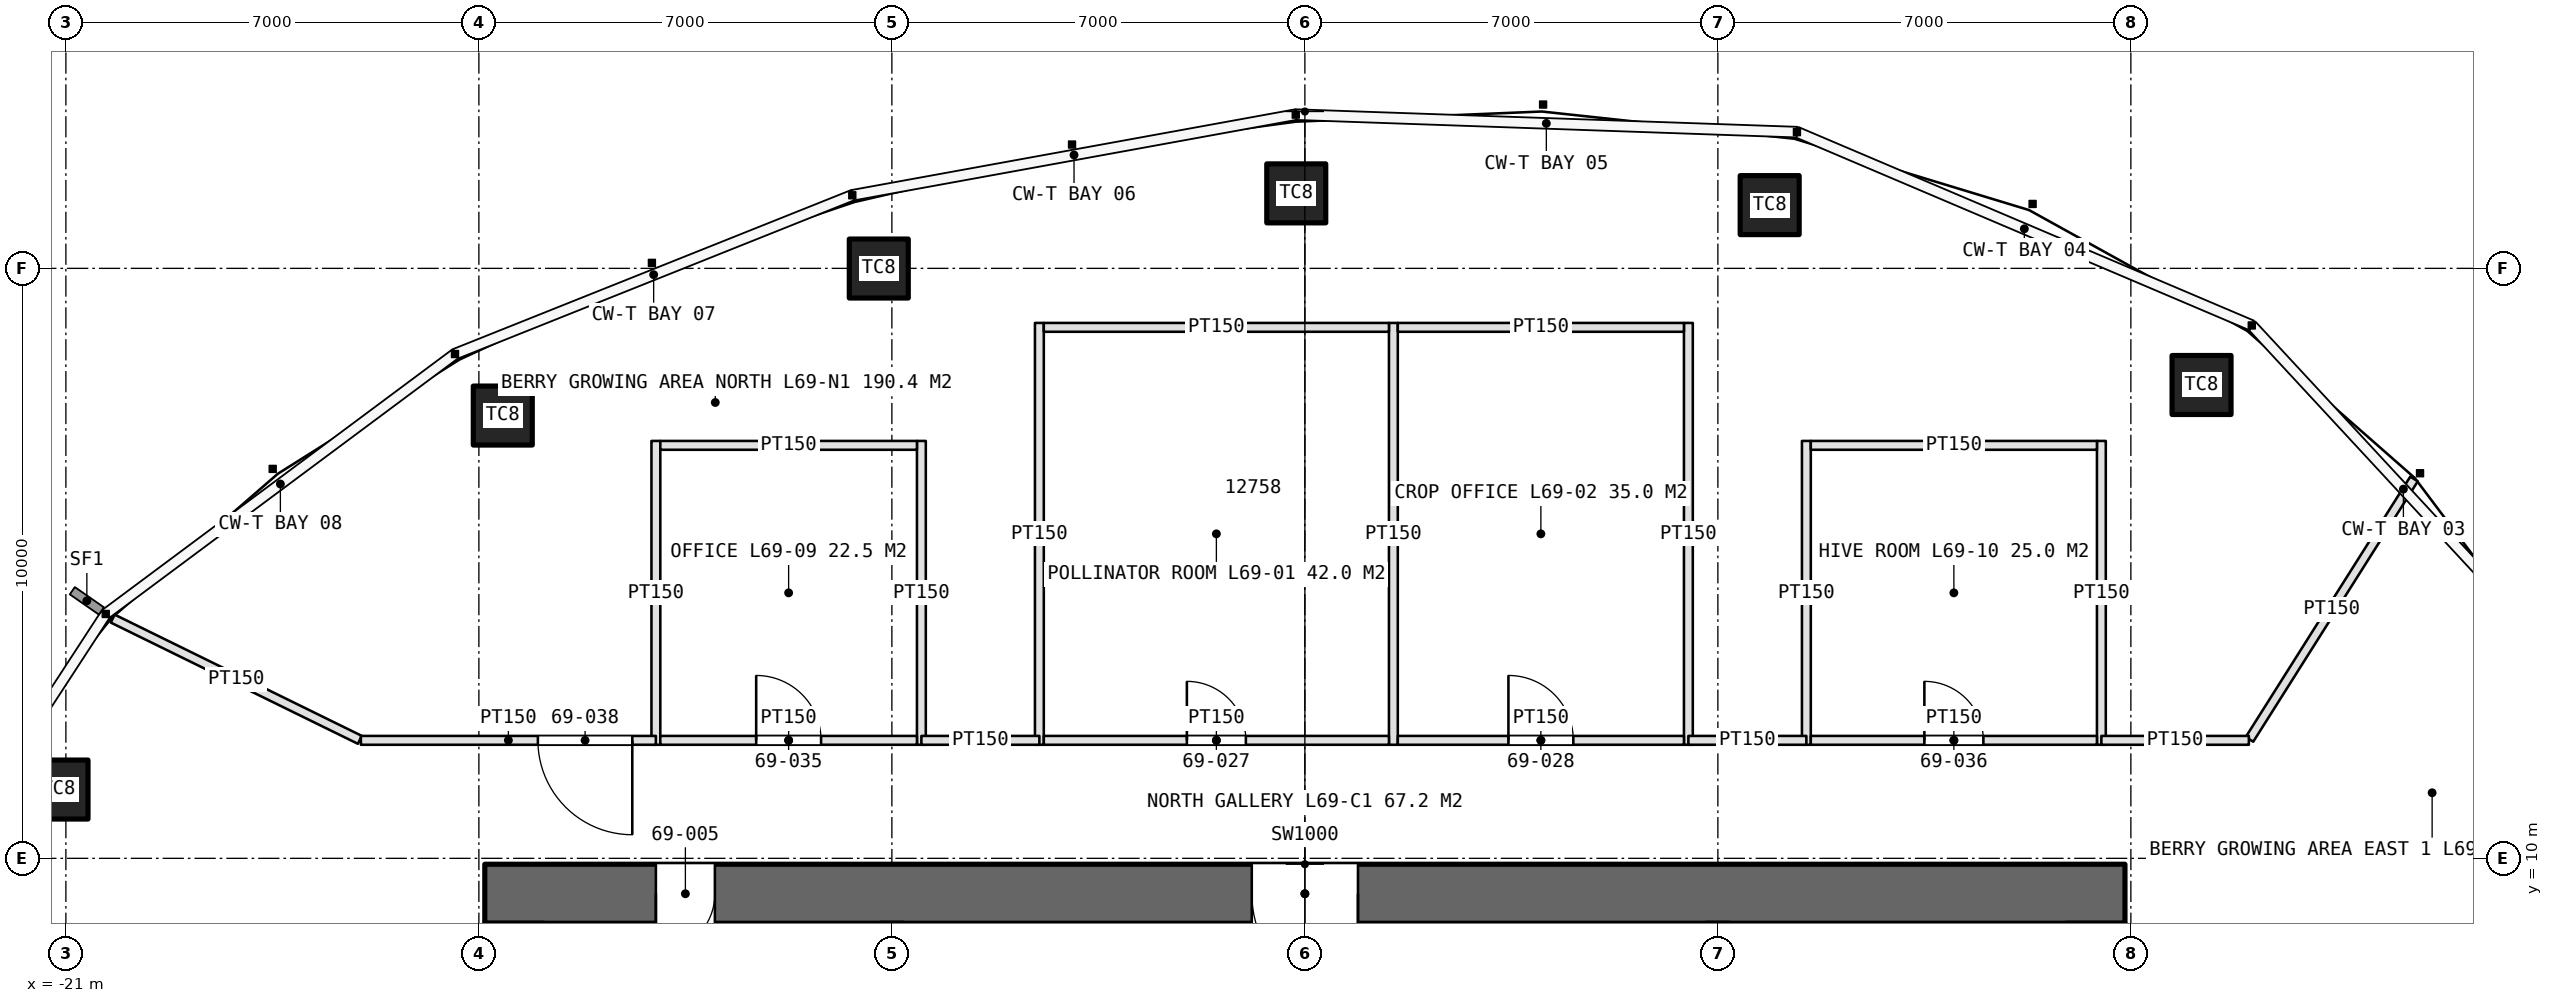
"""IFC4 building model, lengths in metres.
Left out: names, types, materials, properties, quantities, classifications, styles, units other than length and angle.
Written with IfcOpenShell. Run it as: python <this file> out.ifc"""

import sys

from ifc_helpers import new_model, si_unit, direction, frame, frame_2d, origin, origin_2d, place, context, subcontext, project, spatial, rectangle, extrude, element, fill, save


model = new_model("IFC4")
c1 = context("Model", 3, precision=1e-05, world=origin(), true_north=direction((0.0, 1.0)))
c2 = subcontext(c1, "Body", "Model", "MODEL_VIEW")
j1 = project(units=[si_unit("LENGTHUNIT", "METRE"), si_unit("PLANEANGLEUNIT", "RADIAN")], contexts=[c1])
p1 = place(None, origin())
s1 = spatial("IfcSite", under=j1, at=p1, CompositionType="ELEMENT")
p2 = place(p1, origin())
s2 = spatial("IfcBuilding", under=s1, at=p2, CompositionType="ELEMENT")
p3 = place(p2, frame((0.0, 0.0, 309.0)))
s3 = spatial("IfcBuildingStorey", under=s2, at=p3, CompositionType="ELEMENT", Elevation=309.0)
p4 = place(p3, frame((13.9, 9.4, 0.0), z_axis=(0.0, 0.0, 1.0), x_axis=(-1.0, 0.0, 0.0)))
e1 = element("IfcWall", 1, at=p4, inside=s3, PredefinedType="SHEAR", context=c2, shape_type="SweptSolid", body=[
    extrude(rectangle(XDim=27.8, YDim=1.0, at=frame_2d((13.9, 0.0))), origin(), (0.0, 0.0, 1.0), 4.2),
])
p5 = place(p4, frame((23.9, 0.0, 0.0)))
e2 = element("IfcOpeningElement", 2, at=p5, cuts=e1, PredefinedType="OPENING", context=c2, shape_type="SweptSolid", body=[
    extrude(rectangle(XDim=1.0, YDim=2.4, at=frame_2d((0.5, 1.2))), frame((0.0, 0.51, 0.0), z_axis=(0.0, -1.0, 0.0), x_axis=(1.0, 0.0, 0.0)), (0.0, 0.0, 1.0), 1.02),
])
p6 = place(p4, frame((13.0, 0.0, 0.0)))
e3 = element("IfcOpeningElement", 3, at=p6, cuts=e1, PredefinedType="OPENING", context=c2, shape_type="SweptSolid", body=[
    extrude(rectangle(XDim=1.8, YDim=2.4, at=frame_2d((0.9, 1.2))), frame((0.0, 0.51, 0.0), z_axis=(0.0, -1.0, 0.0), x_axis=(1.0, 0.0, 0.0)), (0.0, 0.0, 1.0), 1.02),
])
for number, where, z_axis, x_axis in (
    (4, (15.198, 18.023, 0.0), (0.0, 0.0, 1.0), (1.0, 0.0, 0.0)),
    (5, (7.878, 21.072, 0.0), (0.0, 0.0, 1.0), (1.0, 0.0, 0.0)),
    (6, (-0.146, 21.271, 0.0), (0.0, 0.0, 1.0), (1.0, 0.0, 0.0)),
    (7, (-7.222, 19.997, 0.0), (0.0, 0.0, 1.0), (1.0, 0.0, 0.0)),
    (8, (-13.595, 17.505, 0.0), (0.0, 0.0, 1.0), (1.0, 0.0, 0.0)),
    (9, (-21.125, 11.166, 0.0), (0.0, 0.0, 1.0), (1.0, 0.0, 0.0)),
):
    element("IfcColumn", number, at=place(p3, frame(where, z_axis=z_axis, x_axis=x_axis)), inside=s3, PredefinedType="COLUMN", context=c2, shape_type="SweptSolid", body=[
        extrude(rectangle(XDim=1.0, YDim=1.0, at=origin_2d()), origin(), (0.0, 0.0, 1.0), 4.2),
    ])
for number, where, z_axis, x_axis in (
    (10, (-4.5, 11.925, 0.0), (0.0, 0.0, 1.0), (0.0, 1.0, 0.0)),
    (11, (1.5, 11.925, 0.0), (0.0, 0.0, 1.0), (0.0, 1.0, 0.0)),
    (12, (6.5, 11.925, 0.0), (0.0, 0.0, 1.0), (0.0, 1.0, 0.0)),
):
    element("IfcWall", number, at=place(p3, frame(where, z_axis=z_axis, x_axis=x_axis)), inside=s3, PredefinedType="PARTITIONING", context=c2, shape_type="SweptSolid", body=[
        extrude(rectangle(XDim=7.15, YDim=0.15, at=frame_2d((3.575, 0.0))), origin(), (0.0, 0.0, 1.0), 3.0),
    ])
p7 = place(p3, frame((-4.425, 12.0, 0.0), z_axis=(0.0, 0.0, 1.0), x_axis=(1.0, 0.0, 0.0)))
e13 = element("IfcWall", 13, at=p7, inside=s3, PredefinedType="PARTITIONING", context=c2, shape_type="SweptSolid", body=[
    extrude(rectangle(XDim=5.85, YDim=0.15, at=frame_2d((2.925, 0.0))), origin(), (0.0, 0.0, 1.0), 3.0),
])
p8 = place(p7, frame((2.425, 0.0, 0.0)))
e14 = element("IfcOpeningElement", 14, at=p8, cuts=e13, PredefinedType="OPENING", context=c2, shape_type="SweptSolid", body=[
    extrude(rectangle(XDim=1.0, YDim=2.2, at=frame_2d((0.5, 1.1))), frame((0.0, 0.085, 0.0), z_axis=(0.0, -1.0, 0.0), x_axis=(1.0, 0.0, 0.0)), (0.0, 0.0, 1.0), 0.17),
])
p9 = place(p3, frame((-4.425, 19.0, 0.0), z_axis=(0.0, 0.0, 1.0), x_axis=(1.0, 0.0, 0.0)))
e15 = element("IfcWall", 15, at=p9, inside=s3, PredefinedType="PARTITIONING", context=c2, shape_type="SweptSolid", body=[
    extrude(rectangle(XDim=5.85, YDim=0.15, at=frame_2d((2.925, 0.0))), origin(), (0.0, 0.0, 1.0), 3.0),
])
p10 = place(p3, frame((1.575, 12.0, 0.0), z_axis=(0.0, 0.0, 1.0), x_axis=(1.0, 0.0, 0.0)))
e16 = element("IfcWall", 16, at=p10, inside=s3, PredefinedType="PARTITIONING", context=c2, shape_type="SweptSolid", body=[
    extrude(rectangle(XDim=4.85, YDim=0.15, at=frame_2d((2.425, 0.0))), origin(), (0.0, 0.0, 1.0), 3.0),
])
p11 = place(p10, frame((1.875, 0.0, 0.0)))
e17 = element("IfcOpeningElement", 17, at=p11, cuts=e16, PredefinedType="OPENING", context=c2, shape_type="SweptSolid", body=[
    extrude(rectangle(XDim=1.1, YDim=2.3, at=frame_2d((0.55, 1.15))), frame((0.0, 0.085, 0.0), z_axis=(0.0, -1.0, 0.0), x_axis=(1.0, 0.0, 0.0)), (0.0, 0.0, 1.0), 0.17),
])
p12 = place(p3, frame((1.575, 19.0, 0.0), z_axis=(0.0, 0.0, 1.0), x_axis=(1.0, 0.0, 0.0)))
e18 = element("IfcWall", 18, at=p12, inside=s3, PredefinedType="PARTITIONING", context=c2, shape_type="SweptSolid", body=[
    extrude(rectangle(XDim=4.85, YDim=0.15, at=frame_2d((2.425, 0.0))), origin(), (0.0, 0.0, 1.0), 3.0),
])
for number, where, z_axis, x_axis in (
    (19, (-11.0, 11.925, 0.0), (0.0, 0.0, 1.0), (0.0, 1.0, 0.0)),
    (20, (-6.5, 11.925, 0.0), (0.0, 0.0, 1.0), (0.0, 1.0, 0.0)),
):
    element("IfcWall", number, at=place(p3, frame(where, z_axis=z_axis, x_axis=x_axis)), inside=s3, PredefinedType="PARTITIONING", context=c2, shape_type="SweptSolid", body=[
        extrude(rectangle(XDim=5.15, YDim=0.15, at=frame_2d((2.575, 0.0))), origin(), (0.0, 0.0, 1.0), 3.0),
    ])
p13 = place(p3, frame((-10.925, 12.0, 0.0), z_axis=(0.0, 0.0, 1.0), x_axis=(1.0, 0.0, 0.0)))
e21 = element("IfcWall", 21, at=p13, inside=s3, PredefinedType="PARTITIONING", context=c2, shape_type="SweptSolid", body=[
    extrude(rectangle(XDim=4.35, YDim=0.15, at=frame_2d((2.175, 0.0))), origin(), (0.0, 0.0, 1.0), 3.0),
])
p14 = place(p13, frame((1.625, 0.0, 0.0)))
e22 = element("IfcOpeningElement", 22, at=p14, cuts=e21, PredefinedType="OPENING", context=c2, shape_type="SweptSolid", body=[
    extrude(rectangle(XDim=1.1, YDim=2.3, at=frame_2d((0.55, 1.15))), frame((0.0, 0.085, 0.0), z_axis=(0.0, -1.0, 0.0), x_axis=(1.0, 0.0, 0.0)), (0.0, 0.0, 1.0), 0.17),
])
p15 = place(p3, frame((-10.925, 17.0, 0.0), z_axis=(0.0, 0.0, 1.0), x_axis=(1.0, 0.0, 0.0)))
e23 = element("IfcWall", 23, at=p15, inside=s3, PredefinedType="PARTITIONING", context=c2, shape_type="SweptSolid", body=[
    extrude(rectangle(XDim=4.35, YDim=0.15, at=frame_2d((2.175, 0.0))), origin(), (0.0, 0.0, 1.0), 3.0),
])
for number, where, z_axis, x_axis in (
    (24, (8.5, 11.925, 0.0), (0.0, 0.0, 1.0), (0.0, 1.0, 0.0)),
    (25, (13.5, 11.925, 0.0), (0.0, 0.0, 1.0), (0.0, 1.0, 0.0)),
):
    element("IfcWall", number, at=place(p3, frame(where, z_axis=z_axis, x_axis=x_axis)), inside=s3, PredefinedType="PARTITIONING", context=c2, shape_type="SweptSolid", body=[
        extrude(rectangle(XDim=5.15, YDim=0.15, at=frame_2d((2.575, 0.0))), origin(), (0.0, 0.0, 1.0), 3.0),
    ])
p16 = place(p3, frame((8.575, 12.0, 0.0), z_axis=(0.0, 0.0, 1.0), x_axis=(1.0, 0.0, 0.0)))
e26 = element("IfcWall", 26, at=p16, inside=s3, PredefinedType="PARTITIONING", context=c2, shape_type="SweptSolid", body=[
    extrude(rectangle(XDim=4.85, YDim=0.15, at=frame_2d((2.425, 0.0))), origin(), (0.0, 0.0, 1.0), 3.0),
])
p17 = place(p16, frame((1.925, 0.0, 0.0)))
e27 = element("IfcOpeningElement", 27, at=p17, cuts=e26, PredefinedType="OPENING", context=c2, shape_type="SweptSolid", body=[
    extrude(rectangle(XDim=1.0, YDim=2.2, at=frame_2d((0.5, 1.1))), frame((0.0, 0.085, 0.0), z_axis=(0.0, -1.0, 0.0), x_axis=(1.0, 0.0, 0.0)), (0.0, 0.0, 1.0), 0.17),
])
p18 = place(p3, frame((8.575, 17.0, 0.0), z_axis=(0.0, 0.0, 1.0), x_axis=(1.0, 0.0, 0.0)))
e28 = element("IfcWall", 28, at=p18, inside=s3, PredefinedType="PARTITIONING", context=c2, shape_type="SweptSolid", body=[
    extrude(rectangle(XDim=4.85, YDim=0.15, at=frame_2d((2.425, 0.0))), origin(), (0.0, 0.0, 1.0), 3.0),
])
p19 = place(p3, frame((-16.018, 12.009, 0.0), z_axis=(0.0, 0.0, 1.0), x_axis=(-0.897771840996, 0.440460805879, 0.0)))
e29 = element("IfcWall", 29, at=p19, inside=s3, PredefinedType="PARTITIONING", context=c2, shape_type="SweptSolid", body=[
    extrude(rectangle(XDim=4.666, YDim=0.15, at=frame_2d((2.333, 0.0))), origin(), (0.0, 0.0, 1.0), 3.0),
])
p20 = place(p3, frame((16.011, 12.017, 0.0), z_axis=(0.0, 0.0, 1.0), x_axis=(0.53415837449, 0.845384427916, 0.0)))
e30 = element("IfcWall", 30, at=p20, inside=s3, PredefinedType="PARTITIONING", context=c2, shape_type="SweptSolid", body=[
    extrude(rectangle(XDim=5.22, YDim=0.15, at=frame_2d((2.61, 0.0))), origin(), (0.0, 0.0, 1.0), 3.0),
])
p21 = place(p3, frame((-11.0, 12.0, 0.0), z_axis=(0.0, 0.0, 1.0), x_axis=(-1.0, 0.0, 0.0)))
e31 = element("IfcWall", 31, at=p21, inside=s3, PredefinedType="PARTITIONING", context=c2, shape_type="SweptSolid", body=[
    extrude(rectangle(XDim=5.0, YDim=0.15, at=frame_2d((2.5, 0.0))), origin(), (0.0, 0.0, 1.0), 3.0),
])
p22 = place(p21, frame((0.4, 0.0, 0.0)))
e32 = element("IfcOpeningElement", 32, at=p22, cuts=e31, PredefinedType="OPENING", context=c2, shape_type="SweptSolid", body=[
    extrude(rectangle(XDim=1.6, YDim=2.4, at=frame_2d((0.8, 1.2))), frame((0.0, 0.085, 0.0), z_axis=(0.0, -1.0, 0.0), x_axis=(1.0, 0.0, 0.0)), (0.0, 0.0, 1.0), 0.17),
])
for number, where, z_axis, x_axis in (
    (33, (-4.5, 12.0, 0.0), (0.0, 0.0, 1.0), (-1.0, 0.0, 0.0)),
    (34, (8.5, 12.0, 0.0), (0.0, 0.0, 1.0), (-1.0, 0.0, 0.0)),
):
    element("IfcWall", number, at=place(p3, frame(where, z_axis=z_axis, x_axis=x_axis)), inside=s3, PredefinedType="PARTITIONING", context=c2, shape_type="SweptSolid", body=[
        extrude(rectangle(XDim=2.0, YDim=0.15, at=frame_2d((1.0, 0.0))), origin(), (0.0, 0.0, 1.0), 3.0),
    ])
p23 = place(p3, frame((16.0, 12.0, 0.0), z_axis=(0.0, 0.0, 1.0), x_axis=(-1.0, 0.0, 0.0)))
e35 = element("IfcWall", 35, at=p23, inside=s3, PredefinedType="PARTITIONING", context=c2, shape_type="SweptSolid", body=[
    extrude(rectangle(XDim=2.5, YDim=0.15, at=frame_2d((1.25, 0.0))), origin(), (0.0, 0.0, 1.0), 3.0),
])
p24 = place(p5, origin())
e36 = element("IfcDoor", 36, at=p24, inside=s3, OperationType="SINGLE_SWING_RIGHT", PredefinedType="DOOR", context=c2, shape_type="SweptSolid", body=[
    extrude(rectangle(XDim=1.0, YDim=2.4, at=frame_2d((0.5, 1.2))), frame((0.0, 0.025, 0.0), z_axis=(0.0, -1.0, 0.0), x_axis=(1.0, 0.0, 0.0)), (0.0, 0.0, 1.0), 0.05),
])
fill(e2, e36)
p25 = place(p6, origin())
e37 = element("IfcDoor", 37, at=p25, inside=s3, OperationType="DOUBLE_DOOR_SINGLE_SWING", PredefinedType="DOOR", context=c2, shape_type="SweptSolid", body=[
    extrude(rectangle(XDim=1.8, YDim=2.4, at=frame_2d((0.9, 1.2))), frame((0.0, 0.025, 0.0), z_axis=(0.0, -1.0, 0.0), x_axis=(1.0, 0.0, 0.0)), (0.0, 0.0, 1.0), 0.05),
])
fill(e3, e37)
p26 = place(p8, origin())
e38 = element("IfcDoor", 38, at=p26, inside=s3, OperationType="SINGLE_SWING_LEFT", PredefinedType="DOOR", context=c2, shape_type="SweptSolid", body=[
    extrude(rectangle(XDim=1.0, YDim=2.2, at=frame_2d((0.5, 1.1))), frame((0.0, 0.025, 0.0), z_axis=(0.0, -1.0, 0.0), x_axis=(1.0, 0.0, 0.0)), (0.0, 0.0, 1.0), 0.05),
])
fill(e14, e38)
p27 = place(p11, origin())
e39 = element("IfcDoor", 39, at=p27, inside=s3, OperationType="SINGLE_SWING_LEFT", PredefinedType="DOOR", context=c2, shape_type="SweptSolid", body=[
    extrude(rectangle(XDim=1.1, YDim=2.3, at=frame_2d((0.55, 1.15))), frame((0.0, 0.025, 0.0), z_axis=(0.0, -1.0, 0.0), x_axis=(1.0, 0.0, 0.0)), (0.0, 0.0, 1.0), 0.05),
])
fill(e17, e39)
p28 = place(p14, origin())
e40 = element("IfcDoor", 40, at=p28, inside=s3, OperationType="SINGLE_SWING_LEFT", PredefinedType="DOOR", context=c2, shape_type="SweptSolid", body=[
    extrude(rectangle(XDim=1.1, YDim=2.3, at=frame_2d((0.55, 1.15))), frame((0.0, 0.025, 0.0), z_axis=(0.0, -1.0, 0.0), x_axis=(1.0, 0.0, 0.0)), (0.0, 0.0, 1.0), 0.05),
])
fill(e22, e40)
p29 = place(p17, origin())
e41 = element("IfcDoor", 41, at=p29, inside=s3, OperationType="SINGLE_SWING_LEFT", PredefinedType="DOOR", context=c2, shape_type="SweptSolid", body=[
    extrude(rectangle(XDim=1.0, YDim=2.2, at=frame_2d((0.5, 1.1))), frame((0.0, 0.025, 0.0), z_axis=(0.0, -1.0, 0.0), x_axis=(1.0, 0.0, 0.0)), (0.0, 0.0, 1.0), 0.05),
])
fill(e27, e41)
p30 = place(p22, origin())
e42 = element("IfcDoor", 42, at=p30, inside=s3, OperationType="DOUBLE_DOOR_SINGLE_SWING", PredefinedType="DOOR", context=c2, shape_type="SweptSolid", body=[
    extrude(rectangle(XDim=1.6, YDim=2.4, at=frame_2d((0.8, 1.2))), frame((0.0, 0.025, 0.0), z_axis=(0.0, -1.0, 0.0), x_axis=(1.0, 0.0, 0.0)), (0.0, 0.0, 1.0), 0.05),
])
fill(e32, e42)
save(model, sys.argv[1])
